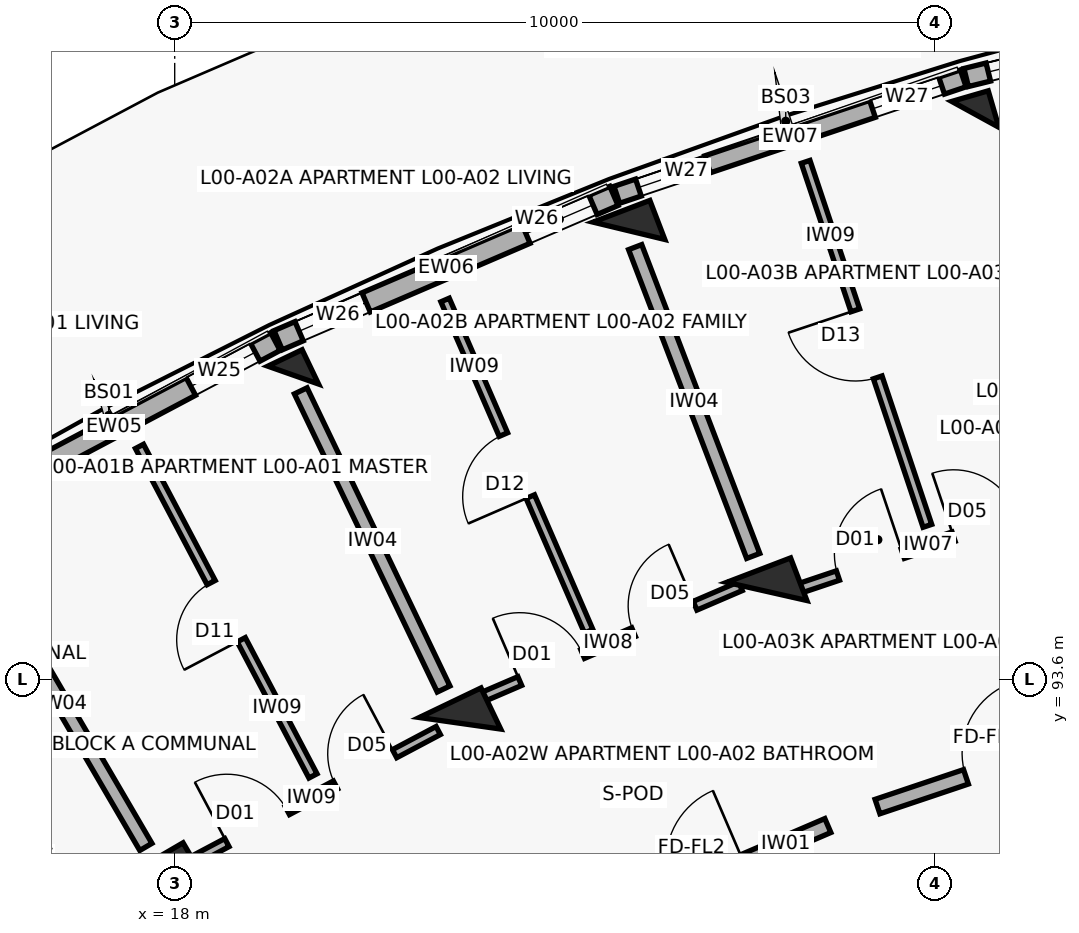
"""IFC4 building model, lengths in metres.
Left out: names, types, materials, properties, quantities, classifications, styles, units other than length and angle.
Written with IfcOpenShell. Run it as: python <this file> out.ifc"""

import sys

from ifc_helpers import new_model, si_unit, direction, frame, frame_2d, origin, origin_2d, place, context, subcontext, project, spatial, rectangle, extrude, element, fill, save


model = new_model("IFC4")
c1 = context("Model", 3, precision=1e-05, world=origin(), true_north=direction((0.0, 1.0)))
c2 = subcontext(c1, "Body", "Model", "MODEL_VIEW")
j1 = project(units=[si_unit("LENGTHUNIT", "METRE"), si_unit("PLANEANGLEUNIT", "RADIAN")], contexts=[c1])
p1 = place(None, origin())
s1 = spatial("IfcSite", under=j1, at=p1, CompositionType="ELEMENT")
p2 = place(p1, origin())
s2 = spatial("IfcBuilding", under=s1, at=p2, CompositionType="ELEMENT")
p3 = place(p2, origin())
s3 = spatial("IfcBuildingStorey", under=s2, at=p3, CompositionType="ELEMENT", Elevation=0.0)
for number, where, z_axis, x_axis in (
    (1, (17.873, 90.96, 0.0), (0.0, 0.0, 1.0), (-0.504, 0.864, 0.0)),
    (2, (21.754, 93.019, 0.0), (0.0, 0.0, 1.0), (-0.432, 0.902, 0.0)),
):
    element("IfcColumn", number, at=place(p3, frame(where, z_axis=z_axis, x_axis=x_axis)), inside=s3, PredefinedType="COLUMN", context=c2, shape_type="SweptSolid", body=[
        extrude(rectangle(XDim=0.6, YDim=0.9, at=origin_2d()), origin(), (0.0, 0.0, 1.0), 4.5),
    ])
p4 = place(p3, frame((19.559, 97.6, 0.0), z_axis=(0.0, 0.0, 1.0), x_axis=(-0.432085748802, 0.901832526405, 0.0)))
e3 = element("IfcColumn", 3, at=p4, inside=s3, PredefinedType="COLUMN", context=c2, shape_type="SweptSolid", body=[
    extrude(rectangle(XDim=0.5, YDim=0.5, at=origin_2d()), origin(), (0.0, 0.0, 1.0), 4.5),
])
p5 = place(p3, frame((25.79, 94.753, 0.0), z_axis=(0.0, 0.0, 1.0), x_axis=(-0.357064076459, 0.934079892355, 0.0)))
e4 = element("IfcColumn", 4, at=p5, inside=s3, PredefinedType="COLUMN", context=c2, shape_type="SweptSolid", body=[
    extrude(rectangle(XDim=0.6, YDim=0.9, at=origin_2d()), origin(), (0.0, 0.0, 1.0), 4.5),
])
p6 = place(p3, frame((23.976, 99.499, 0.0), z_axis=(0.0, 0.0, 1.0), x_axis=(-0.357064076459, 0.934079892355, 0.0)))
e5 = element("IfcColumn", 5, at=p6, inside=s3, PredefinedType="COLUMN", context=c2, shape_type="SweptSolid", body=[
    extrude(rectangle(XDim=0.55, YDim=0.8, at=origin_2d()), origin(), (0.0, 0.0, 1.0), 4.5),
])
p7 = place(p3, frame((28.533, 101.031, 0.0), z_axis=(0.0, 0.0, 1.0), x_axis=(-0.27966144946, 0.96009867914, 0.0)))
e6 = element("IfcColumn", 6, at=p7, inside=s3, PredefinedType="COLUMN", context=c2, shape_type="SweptSolid", body=[
    extrude(rectangle(XDim=0.5, YDim=0.5, at=origin_2d()), origin(), (0.0, 0.0, 1.0), 4.5),
])
p8 = place(p3, frame((15.077, 95.788, 0.0), z_axis=(0.0, 0.0, 1.0), x_axis=(0.883448093208, 0.468529045639, 0.0)))
e7 = element("IfcWall", 7, at=p8, inside=s3, PredefinedType="SOLIDWALL", context=c2, shape_type="SweptSolid", body=[
    extrude(rectangle(XDim=4.809, YDim=0.265, at=frame_2d((2.405, 0.0))), origin(), (0.0, 0.0, 1.0), 3.45),
])
p9 = place(p8, frame((0.3, 0.0, 0.3)))
e8 = element("IfcOpeningElement", 8, at=p9, cuts=e7, PredefinedType="OPENING", context=c2, shape_type="SweptSolid", body=[
    extrude(rectangle(XDim=0.96, YDim=1.16, at=frame_2d((0.48, 0.58))), frame((0.0, 0.142, 0.0), z_axis=(0.0, -1.0, 0.0), x_axis=(1.0, 0.0, 0.0)), (0.0, 0.0, 1.0), 0.285),
])
p10 = place(p8, frame((3.549, 0.0, 0.3)))
e9 = element("IfcOpeningElement", 9, at=p10, cuts=e7, PredefinedType="OPENING", context=c2, shape_type="SweptSolid", body=[
    extrude(rectangle(XDim=0.96, YDim=1.16, at=frame_2d((0.48, 0.58))), frame((0.0, 0.142, 0.0), z_axis=(0.0, -1.0, 0.0), x_axis=(1.0, 0.0, 0.0)), (0.0, 0.0, 1.0), 0.285),
])
p11 = place(p3, frame((19.361, 98.059, 0.0), z_axis=(0.0, 0.0, 1.0), x_axis=(0.918711189033, 0.394930058548, 0.0)))
e10 = element("IfcWall", 10, at=p11, inside=s3, PredefinedType="SOLIDWALL", context=c2, shape_type="SweptSolid", body=[
    extrude(rectangle(XDim=4.809, YDim=0.275, at=frame_2d((2.404, 0.0))), origin(), (0.0, 0.0, 1.0), 3.45),
])
p12 = place(p11, frame((0.3, 0.0, 0.3)))
e11 = element("IfcOpeningElement", 11, at=p12, cuts=e10, PredefinedType="OPENING", context=c2, shape_type="SweptSolid", body=[
    extrude(rectangle(XDim=0.96, YDim=1.28, at=frame_2d((0.48, 0.64))), frame((0.0, 0.147, 0.0), z_axis=(0.0, -1.0, 0.0), x_axis=(1.0, 0.0, 0.0)), (0.0, 0.0, 1.0), 0.295),
])
p13 = place(p11, frame((3.549, 0.0, 0.3)))
e12 = element("IfcOpeningElement", 12, at=p13, cuts=e10, PredefinedType="OPENING", context=c2, shape_type="SweptSolid", body=[
    extrude(rectangle(XDim=0.96, YDim=1.28, at=frame_2d((0.48, 0.64))), frame((0.0, 0.147, 0.0), z_axis=(0.0, -1.0, 0.0), x_axis=(1.0, 0.0, 0.0)), (0.0, 0.0, 1.0), 0.295),
])
p14 = place(p3, frame((23.816, 99.972, 0.0), z_axis=(0.0, 0.0, 1.0), x_axis=(0.947867898788, 0.318663531717, 0.0)))
e13 = element("IfcWall", 13, at=p14, inside=s3, PredefinedType="SOLIDWALL", context=c2, shape_type="SweptSolid", body=[
    extrude(rectangle(XDim=4.809, YDim=0.235, at=frame_2d((2.405, 0.0))), origin(), (0.0, 0.0, 1.0), 3.45),
])
p15 = place(p14, frame((0.3, 0.0, 0.3)))
e14 = element("IfcOpeningElement", 14, at=p15, cuts=e13, PredefinedType="OPENING", context=c2, shape_type="SweptSolid", body=[
    extrude(rectangle(XDim=0.96, YDim=1.42, at=frame_2d((0.48, 0.71))), frame((0.0, 0.127, 0.0), z_axis=(0.0, -1.0, 0.0), x_axis=(1.0, 0.0, 0.0)), (0.0, 0.0, 1.0), 0.255),
])
p16 = place(p14, frame((3.549, 0.0, 0.3)))
e15 = element("IfcOpeningElement", 15, at=p16, cuts=e13, PredefinedType="OPENING", context=c2, shape_type="SweptSolid", body=[
    extrude(rectangle(XDim=0.96, YDim=1.42, at=frame_2d((0.48, 0.71))), frame((0.0, 0.127, 0.0), z_axis=(0.0, -1.0, 0.0), x_axis=(1.0, 0.0, 0.0)), (0.0, 0.0, 1.0), 0.255),
])
p17 = place(p3, frame((28.413, 101.515, 0.0), z_axis=(0.0, 0.0, 1.0), x_axis=(0.970716115822, 0.240229520426, 0.0)))
e16 = element("IfcWall", 16, at=p17, inside=s3, PredefinedType="SOLIDWALL", context=c2, shape_type="SweptSolid", body=[
    extrude(rectangle(XDim=4.809, YDim=0.245, at=frame_2d((2.405, 0.0))), origin(), (0.0, 0.0, 1.0), 3.45),
])
p18 = place(p17, frame((0.3, 0.0, 0.3)))
e17 = element("IfcOpeningElement", 17, at=p18, cuts=e16, PredefinedType="OPENING", context=c2, shape_type="SweptSolid", body=[
    extrude(rectangle(XDim=0.96, YDim=1.56, at=frame_2d((0.48, 0.78))), frame((0.0, 0.133, 0.0), z_axis=(0.0, -1.0, 0.0), x_axis=(1.0, 0.0, 0.0)), (0.0, 0.0, 1.0), 0.265),
])
p19 = place(p17, frame((3.549, 0.0, 0.3)))
e18 = element("IfcOpeningElement", 18, at=p19, cuts=e16, PredefinedType="OPENING", context=c2, shape_type="SweptSolid", body=[
    extrude(rectangle(XDim=0.96, YDim=1.56, at=frame_2d((0.48, 0.78))), frame((0.0, 0.133, 0.0), z_axis=(0.0, -1.0, 0.0), x_axis=(1.0, 0.0, 0.0)), (0.0, 0.0, 1.0), 0.265),
])
p20 = place(p3, frame((17.524, 87.288, 0.0), z_axis=(0.0, 0.0, 1.0), x_axis=(-0.540338452216, 0.841447774408, 0.0)))
e19 = element("IfcWall", 19, at=p20, inside=s3, PredefinedType="PARTITIONING", context=c2, shape_type="SweptSolid", body=[
    extrude(rectangle(XDim=7.95, YDim=0.14, at=frame_2d((3.975, 0.0))), origin(), (0.0, 0.0, 1.0), 3.34),
])
p21 = place(p20, frame((6.05, 0.0, 0.0)))
e20 = element("IfcOpeningElement", 20, at=p21, cuts=e19, PredefinedType="OPENING", context=c2, shape_type="SweptSolid", body=[
    extrude(rectangle(XDim=0.92, YDim=2.1, at=frame_2d((0.46, 1.05))), frame((0.0, 0.08, 0.0), z_axis=(0.0, -1.0, 0.0), x_axis=(1.0, 0.0, 0.0)), (0.0, 0.0, 1.0), 0.16),
])
p22 = place(p3, frame((18.113, 91.144, 0.0), z_axis=(0.0, 0.0, 1.0), x_axis=(0.88341855112, 0.46858474531, 0.0)))
e21 = element("IfcWall", 21, at=p22, inside=s3, PredefinedType="PARTITIONING", context=c2, shape_type="SweptSolid", body=[
    extrude(rectangle(XDim=3.797, YDim=0.12, at=frame_2d((1.898, 0.0))), origin(), (0.0, 0.0, 1.0), 3.34),
])
p23 = place(p22, frame((0.65, 0.0, 0.0)))
e22 = element("IfcOpeningElement", 22, at=p23, cuts=e21, PredefinedType="OPENING", context=c2, shape_type="SweptSolid", body=[
    extrude(rectangle(XDim=0.9, YDim=2.1, at=frame_2d((0.45, 1.05))), frame((0.0, 0.07, 0.0), z_axis=(0.0, -1.0, 0.0), x_axis=(1.0, 0.0, 0.0)), (0.0, 0.0, 1.0), 0.14),
])
p24 = place(p22, frame((2.267, 0.0, 0.0)))
e23 = element("IfcOpeningElement", 23, at=p24, cuts=e21, PredefinedType="OPENING", context=c2, shape_type="SweptSolid", body=[
    extrude(rectangle(XDim=0.88, YDim=2.1, at=frame_2d((0.44, 1.05))), frame((0.0, 0.07, 0.0), z_axis=(0.0, -1.0, 0.0), x_axis=(1.0, 0.0, 0.0)), (0.0, 0.0, 1.0), 0.14),
])
p25 = place(p3, frame((19.819, 92.326, 0.0), z_axis=(0.0, 0.0, 1.0), x_axis=(-0.465849102717, 0.884864177995, 0.0)))
e24 = element("IfcWall", 24, at=p25, inside=s3, PredefinedType="PARTITIONING", context=c2, shape_type="SweptSolid", body=[
    extrude(rectangle(XDim=4.9, YDim=0.12, at=frame_2d((2.45, 0.0))), origin(), (0.0, 0.0, 1.0), 3.34),
])
p26 = place(p25, frame((2.025, 0.0, 0.0)))
e25 = element("IfcOpeningElement", 25, at=p26, cuts=e24, PredefinedType="OPENING", context=c2, shape_type="SweptSolid", body=[
    extrude(rectangle(XDim=0.85, YDim=2.1, at=frame_2d((0.425, 1.05))), frame((0.0, 0.07, 0.0), z_axis=(0.0, -1.0, 0.0), x_axis=(1.0, 0.0, 0.0)), (0.0, 0.0, 1.0), 0.14),
])
p27 = place(p3, frame((17.621, 91.392, 0.0), z_axis=(0.0, 0.0, 1.0), x_axis=(-0.504216452091, 0.863577309475, 0.0)))
e26 = element("IfcWall", 26, at=p27, inside=s3, PredefinedType="SOLIDWALL", context=c2, shape_type="SweptSolid", body=[
    extrude(rectangle(XDim=4.35, YDim=0.185, at=frame_2d((2.175, 0.0))), origin(), (0.0, 0.0, 1.0), 3.34),
])
p28 = place(p3, frame((23.437, 90.316, 0.0), z_axis=(0.0, 0.0, 1.0), x_axis=(0.918718172399, 0.394913813008, 0.0)))
e27 = element("IfcWall", 27, at=p28, inside=s3, PredefinedType="SOLIDWALL", context=c2, shape_type="SweptSolid", body=[
    extrude(rectangle(XDim=3.436, YDim=0.2, at=frame_2d((1.718, 0.0))), origin(), (0.0, 0.0, 1.0), 3.34),
])
p29 = place(p28, frame((1.208, 0.0, 0.0)))
e28 = element("IfcOpeningElement", 28, at=p29, cuts=e27, PredefinedType="OPENING", context=c2, shape_type="SweptSolid", body=[
    extrude(rectangle(XDim=1.02, YDim=2.15, at=frame_2d((0.51, 1.075))), frame((0.0, 0.11, 0.0), z_axis=(0.0, -1.0, 0.0), x_axis=(1.0, 0.0, 0.0)), (0.0, 0.0, 1.0), 0.22),
])
p30 = place(p3, frame((21.943, 93.317, 0.0), z_axis=(0.0, 0.0, 1.0), x_axis=(0.918726854017, 0.394893615684, 0.0)))
e29 = element("IfcWall", 29, at=p30, inside=s3, PredefinedType="PARTITIONING", context=c2, shape_type="SweptSolid", body=[
    extrude(rectangle(XDim=3.81, YDim=0.125, at=frame_2d((1.905, 0.0))), origin(), (0.0, 0.0, 1.0), 3.34),
])
p31 = place(p30, frame((0.65, 0.0, 0.0)))
e30 = element("IfcOpeningElement", 30, at=p31, cuts=e29, PredefinedType="OPENING", context=c2, shape_type="SweptSolid", body=[
    extrude(rectangle(XDim=0.9, YDim=2.1, at=frame_2d((0.45, 1.05))), frame((0.0, 0.073, 0.0), z_axis=(0.0, -1.0, 0.0), x_axis=(1.0, 0.0, 0.0)), (0.0, 0.0, 1.0), 0.145),
])
p32 = place(p30, frame((2.28, 0.0, 0.0)))
e31 = element("IfcOpeningElement", 31, at=p32, cuts=e29, PredefinedType="OPENING", context=c2, shape_type="SweptSolid", body=[
    extrude(rectangle(XDim=0.88, YDim=2.1, at=frame_2d((0.44, 1.05))), frame((0.0, 0.073, 0.0), z_axis=(0.0, -1.0, 0.0), x_axis=(1.0, 0.0, 0.0)), (0.0, 0.0, 1.0), 0.145),
])
p33 = place(p3, frame((23.446, 94.23, 0.0), z_axis=(0.0, 0.0, 1.0), x_axis=(-0.3976752315, 0.917526244993, 0.0)))
e32 = element("IfcWall", 32, at=p33, inside=s3, PredefinedType="PARTITIONING", context=c2, shape_type="SweptSolid", body=[
    extrude(rectangle(XDim=4.75, YDim=0.12, at=frame_2d((2.375, 0.0))), origin(), (0.0, 0.0, 1.0), 3.34),
])
p34 = place(p33, frame((1.93, 0.0, 0.0)))
e33 = element("IfcOpeningElement", 33, at=p34, cuts=e32, PredefinedType="OPENING", context=c2, shape_type="SweptSolid", body=[
    extrude(rectangle(XDim=0.89, YDim=2.1, at=frame_2d((0.445, 1.05))), frame((0.0, 0.07, 0.0), z_axis=(0.0, -1.0, 0.0), x_axis=(1.0, 0.0, 0.0)), (0.0, 0.0, 1.0), 0.14),
])
p35 = place(p3, frame((21.538, 93.469, 0.0), z_axis=(0.0, 0.0, 1.0), x_axis=(-0.432086898897, 0.901831975371, 0.0)))
e34 = element("IfcWall", 34, at=p35, inside=s3, PredefinedType="SOLIDWALL", context=c2, shape_type="SweptSolid", body=[
    extrude(rectangle(XDim=4.35, YDim=0.185, at=frame_2d((2.175, 0.0))), origin(), (0.0, 0.0, 1.0), 3.34),
])
p36 = place(p3, frame((27.247, 91.923, 0.0), z_axis=(0.0, 0.0, 1.0), x_axis=(0.947863007629, 0.318678080151, 0.0)))
e35 = element("IfcWall", 35, at=p36, inside=s3, PredefinedType="SOLIDWALL", context=c2, shape_type="SweptSolid", body=[
    extrude(rectangle(XDim=3.436, YDim=0.2, at=frame_2d((1.718, 0.0))), origin(), (0.0, 0.0, 1.0), 3.34),
])
p37 = place(p36, frame((1.228, 0.0, 0.0)))
e36 = element("IfcOpeningElement", 36, at=p37, cuts=e35, PredefinedType="OPENING", context=c2, shape_type="SweptSolid", body=[
    extrude(rectangle(XDim=0.98, YDim=2.15, at=frame_2d((0.49, 1.075))), frame((0.0, 0.11, 0.0), z_axis=(0.0, -1.0, 0.0), x_axis=(1.0, 0.0, 0.0)), (0.0, 0.0, 1.0), 0.22),
])
p38 = place(p3, frame((26.11, 94.756, 0.0), z_axis=(0.0, 0.0, 1.0), x_axis=(0.947873924847, 0.318645606584, 0.0)))
e37 = element("IfcWall", 37, at=p38, inside=s3, PredefinedType="PARTITIONING", context=c2, shape_type="SweptSolid", body=[
    extrude(rectangle(XDim=3.785, YDim=0.13, at=frame_2d((1.893, 0.0))), origin(), (0.0, 0.0, 1.0), 3.34),
])
p39 = place(p38, frame((0.65, 0.0, 0.0)))
e38 = element("IfcOpeningElement", 38, at=p39, cuts=e37, PredefinedType="OPENING", context=c2, shape_type="SweptSolid", body=[
    extrude(rectangle(XDim=0.9, YDim=2.1, at=frame_2d((0.45, 1.05))), frame((0.0, 0.075, 0.0), z_axis=(0.0, -1.0, 0.0), x_axis=(1.0, 0.0, 0.0)), (0.0, 0.0, 1.0), 0.15),
])
p40 = place(p38, frame((2.255, 0.0, 0.0)))
e39 = element("IfcOpeningElement", 39, at=p40, cuts=e37, PredefinedType="OPENING", context=c2, shape_type="SweptSolid", body=[
    extrude(rectangle(XDim=0.88, YDim=2.1, at=frame_2d((0.44, 1.05))), frame((0.0, 0.075, 0.0), z_axis=(0.0, -1.0, 0.0), x_axis=(1.0, 0.0, 0.0)), (0.0, 0.0, 1.0), 0.15),
])
p41 = place(p3, frame((27.903, 95.616, 0.0), z_axis=(0.0, 0.0, 1.0), x_axis=(-0.31722829501, 0.948349201953, 0.0)))
e40 = element("IfcWall", 40, at=p41, inside=s3, PredefinedType="PARTITIONING", context=c2, shape_type="SweptSolid", body=[
    extrude(rectangle(XDim=5.05, YDim=0.12, at=frame_2d((2.525, 0.0))), origin(), (0.0, 0.0, 1.0), 3.34),
])
p42 = place(p41, frame((2.06, 0.0, 0.0)))
e41 = element("IfcOpeningElement", 41, at=p42, cuts=e40, PredefinedType="OPENING", context=c2, shape_type="SweptSolid", body=[
    extrude(rectangle(XDim=0.93, YDim=2.1, at=frame_2d((0.465, 1.05))), frame((0.0, 0.07, 0.0), z_axis=(0.0, -1.0, 0.0), x_axis=(1.0, 0.0, 0.0)), (0.0, 0.0, 1.0), 0.14),
])
p43 = place(p3, frame((25.611, 95.22, 0.0), z_axis=(0.0, 0.0, 1.0), x_axis=(-0.357064016205, 0.934079915388, 0.0)))
e42 = element("IfcWall", 42, at=p43, inside=s3, PredefinedType="SOLIDWALL", context=c2, shape_type="SweptSolid", body=[
    extrude(rectangle(XDim=4.35, YDim=0.185, at=frame_2d((2.175, 0.0))), origin(), (0.0, 0.0, 1.0), 3.34),
])
p44 = place(p10, origin())
e43 = element("IfcWindow", 43, at=p44, inside=s3, PartitioningType="DOUBLE_PANEL_VERTICAL", PredefinedType="WINDOW", context=c2, shape_type="SweptSolid", body=[
    extrude(rectangle(XDim=0.96, YDim=1.16, at=frame_2d((0.48, 0.58))), frame((0.0, 0.03, 0.0), z_axis=(0.0, -1.0, 0.0), x_axis=(1.0, 0.0, 0.0)), (0.0, 0.0, 1.0), 0.06),
])
fill(e9, e43)
p45 = place(p12, origin())
e44 = element("IfcWindow", 44, at=p45, inside=s3, PartitioningType="DOUBLE_PANEL_VERTICAL", PredefinedType="WINDOW", context=c2, shape_type="SweptSolid", body=[
    extrude(rectangle(XDim=0.96, YDim=1.28, at=frame_2d((0.48, 0.64))), frame((0.0, 0.03, 0.0), z_axis=(0.0, -1.0, 0.0), x_axis=(1.0, 0.0, 0.0)), (0.0, 0.0, 1.0), 0.06),
])
fill(e11, e44)
p46 = place(p13, origin())
e45 = element("IfcWindow", 45, at=p46, inside=s3, PartitioningType="DOUBLE_PANEL_VERTICAL", PredefinedType="WINDOW", context=c2, shape_type="SweptSolid", body=[
    extrude(rectangle(XDim=0.96, YDim=1.28, at=frame_2d((0.48, 0.64))), frame((0.0, 0.03, 0.0), z_axis=(0.0, -1.0, 0.0), x_axis=(1.0, 0.0, 0.0)), (0.0, 0.0, 1.0), 0.06),
])
fill(e12, e45)
p47 = place(p15, origin())
e46 = element("IfcWindow", 46, at=p47, inside=s3, PartitioningType="DOUBLE_PANEL_VERTICAL", PredefinedType="WINDOW", context=c2, shape_type="SweptSolid", body=[
    extrude(rectangle(XDim=0.96, YDim=1.42, at=frame_2d((0.48, 0.71))), frame((0.0, 0.03, 0.0), z_axis=(0.0, -1.0, 0.0), x_axis=(1.0, 0.0, 0.0)), (0.0, 0.0, 1.0), 0.06),
])
fill(e14, e46)
p48 = place(p16, origin())
e47 = element("IfcWindow", 47, at=p48, inside=s3, PartitioningType="DOUBLE_PANEL_VERTICAL", PredefinedType="WINDOW", context=c2, shape_type="SweptSolid", body=[
    extrude(rectangle(XDim=0.96, YDim=1.42, at=frame_2d((0.48, 0.71))), frame((0.0, 0.03, 0.0), z_axis=(0.0, -1.0, 0.0), x_axis=(1.0, 0.0, 0.0)), (0.0, 0.0, 1.0), 0.06),
])
fill(e15, e47)
p49 = place(p18, origin())
e48 = element("IfcWindow", 48, at=p49, inside=s3, PartitioningType="DOUBLE_PANEL_VERTICAL", PredefinedType="WINDOW", context=c2, shape_type="SweptSolid", body=[
    extrude(rectangle(XDim=0.96, YDim=1.56, at=frame_2d((0.48, 0.78))), frame((0.0, 0.03, 0.0), z_axis=(0.0, -1.0, 0.0), x_axis=(1.0, 0.0, 0.0)), (0.0, 0.0, 1.0), 0.06),
])
fill(e17, e48)
p50 = place(p23, origin())
e49 = element("IfcDoor", 49, at=p50, inside=s3, OperationType="SINGLE_SWING_LEFT", PredefinedType="DOOR", context=c2, shape_type="SweptSolid", body=[
    extrude(rectangle(XDim=0.9, YDim=2.1, at=frame_2d((0.45, 1.05))), frame((0.0, 0.025, 0.0), z_axis=(0.0, -1.0, 0.0), x_axis=(1.0, 0.0, 0.0)), (0.0, 0.0, 1.0), 0.05),
])
fill(e22, e49)
p51 = place(p24, origin())
e50 = element("IfcDoor", 50, at=p51, inside=s3, OperationType="SINGLE_SWING_RIGHT", PredefinedType="DOOR", context=c2, shape_type="SweptSolid", body=[
    extrude(rectangle(XDim=0.88, YDim=2.1, at=frame_2d((0.44, 1.05))), frame((0.0, 0.025, 0.0), z_axis=(0.0, -1.0, 0.0), x_axis=(1.0, 0.0, 0.0)), (0.0, 0.0, 1.0), 0.05),
])
fill(e23, e50)
p52 = place(p26, origin())
e51 = element("IfcDoor", 51, at=p52, inside=s3, OperationType="SINGLE_SWING_LEFT", PredefinedType="DOOR", context=c2, shape_type="SweptSolid", body=[
    extrude(rectangle(XDim=0.85, YDim=2.1, at=frame_2d((0.425, 1.05))), frame((0.0, 0.025, 0.0), z_axis=(0.0, -1.0, 0.0), x_axis=(1.0, 0.0, 0.0)), (0.0, 0.0, 1.0), 0.05),
])
fill(e25, e51)
p53 = place(p31, origin())
e52 = element("IfcDoor", 52, at=p53, inside=s3, OperationType="SINGLE_SWING_LEFT", PredefinedType="DOOR", context=c2, shape_type="SweptSolid", body=[
    extrude(rectangle(XDim=0.9, YDim=2.1, at=frame_2d((0.45, 1.05))), frame((0.0, 0.025, 0.0), z_axis=(0.0, -1.0, 0.0), x_axis=(1.0, 0.0, 0.0)), (0.0, 0.0, 1.0), 0.05),
])
fill(e30, e52)
p54 = place(p32, origin())
e53 = element("IfcDoor", 53, at=p54, inside=s3, OperationType="SINGLE_SWING_RIGHT", PredefinedType="DOOR", context=c2, shape_type="SweptSolid", body=[
    extrude(rectangle(XDim=0.88, YDim=2.1, at=frame_2d((0.44, 1.05))), frame((0.0, 0.025, 0.0), z_axis=(0.0, -1.0, 0.0), x_axis=(1.0, 0.0, 0.0)), (0.0, 0.0, 1.0), 0.05),
])
fill(e31, e53)
p55 = place(p34, origin())
e54 = element("IfcDoor", 54, at=p55, inside=s3, OperationType="SINGLE_SWING_LEFT", PredefinedType="DOOR", context=c2, shape_type="SweptSolid", body=[
    extrude(rectangle(XDim=0.89, YDim=2.1, at=frame_2d((0.445, 1.05))), frame((0.0, 0.025, 0.0), z_axis=(0.0, -1.0, 0.0), x_axis=(1.0, 0.0, 0.0)), (0.0, 0.0, 1.0), 0.05),
])
fill(e33, e54)
p56 = place(p37, origin())
e55 = element("IfcDoor", 55, at=p56, inside=s3, OperationType="SINGLE_SWING_RIGHT", PredefinedType="DOOR", context=c2, shape_type="SweptSolid", body=[
    extrude(rectangle(XDim=0.98, YDim=2.15, at=frame_2d((0.49, 1.075))), frame((0.0, 0.025, 0.0), z_axis=(0.0, -1.0, 0.0), x_axis=(1.0, 0.0, 0.0)), (0.0, 0.0, 1.0), 0.05),
])
fill(e36, e55)
p57 = place(p39, origin())
e56 = element("IfcDoor", 56, at=p57, inside=s3, OperationType="SINGLE_SWING_RIGHT", PredefinedType="DOOR", context=c2, shape_type="SweptSolid", body=[
    extrude(rectangle(XDim=0.9, YDim=2.1, at=frame_2d((0.45, 1.05))), frame((0.0, 0.025, 0.0), z_axis=(0.0, -1.0, 0.0), x_axis=(1.0, 0.0, 0.0)), (0.0, 0.0, 1.0), 0.05),
])
fill(e38, e56)
p58 = place(p40, origin())
e57 = element("IfcDoor", 57, at=p58, inside=s3, OperationType="SINGLE_SWING_LEFT", PredefinedType="DOOR", context=c2, shape_type="SweptSolid", body=[
    extrude(rectangle(XDim=0.88, YDim=2.1, at=frame_2d((0.44, 1.05))), frame((0.0, 0.025, 0.0), z_axis=(0.0, -1.0, 0.0), x_axis=(1.0, 0.0, 0.0)), (0.0, 0.0, 1.0), 0.05),
])
fill(e39, e57)
p59 = place(p42, origin())
e58 = element("IfcDoor", 58, at=p59, inside=s3, OperationType="SINGLE_SWING_RIGHT", PredefinedType="DOOR", context=c2, shape_type="SweptSolid", body=[
    extrude(rectangle(XDim=0.93, YDim=2.1, at=frame_2d((0.465, 1.05))), frame((0.0, 0.025, 0.0), z_axis=(0.0, -1.0, 0.0), x_axis=(1.0, 0.0, 0.0)), (0.0, 0.0, 1.0), 0.05),
])
fill(e41, e58)
save(model, sys.argv[1])
